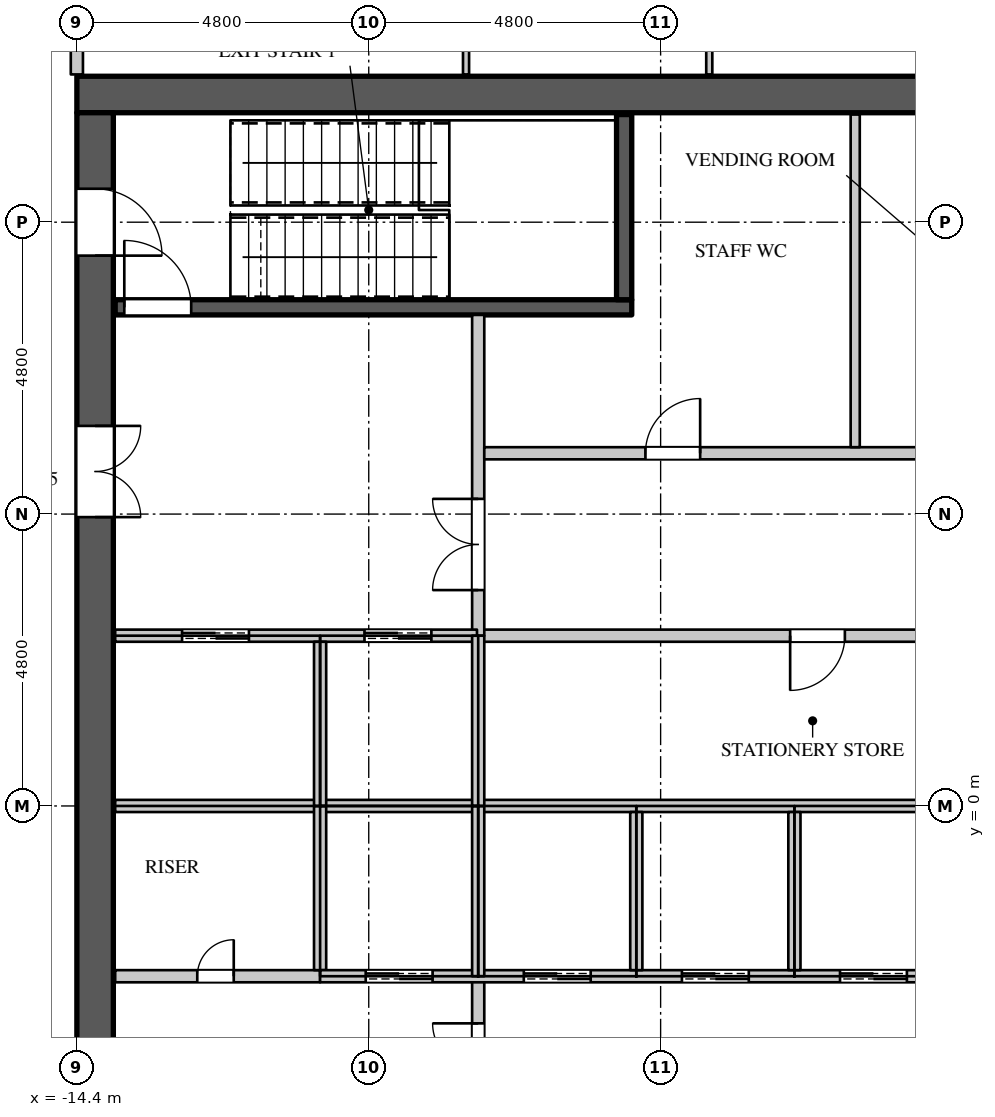
"""IFC4 building model, lengths in metres.
Left out: names, types, materials, properties, quantities, classifications, styles, units other than length and angle.
Written with IfcOpenShell. Run it as: python <this file> out.ifc"""

import sys

from ifc_helpers import new_model, si_unit, direction, frame, frame_2d, origin, place, context, subcontext, project, spatial, rectangle, extrude, element, fill, save


model = new_model("IFC4")
c1 = context("Model", 3, precision=1e-05, world=origin(), true_north=direction((0.0, 1.0)))
c2 = subcontext(c1, "Body", "Model", "MODEL_VIEW")
j1 = project(units=[si_unit("LENGTHUNIT", "METRE"), si_unit("PLANEANGLEUNIT", "RADIAN")], contexts=[c1])
p1 = place(None, origin())
s1 = spatial("IfcSite", under=j1, at=p1, CompositionType="ELEMENT")
p2 = place(p1, origin())
s2 = spatial("IfcBuilding", under=s1, at=p2, CompositionType="ELEMENT")
p3 = place(p2, frame((0.0, 0.0, 239.1)))
s3 = spatial("IfcBuildingStorey", under=s2, at=p3, CompositionType="ELEMENT", Elevation=239.1)
p4 = place(p3, frame((-14.4, 11.7, 0.0), z_axis=(0.0, 0.0, 1.0), x_axis=(1.0, 0.0, 0.0)))
e1 = element("IfcWall", 1, at=p4, inside=s3, PredefinedType="SHEAR", context=c2, shape_type="SweptSolid", body=[
    extrude(rectangle(XDim=28.8, YDim=0.6, at=frame_2d((14.4, 0.0))), origin(), (0.0, 0.0, 1.0), 4.2),
])
p5 = place(p3, frame((-14.1, -11.4, 0.0), z_axis=(0.0, 0.0, 1.0), x_axis=(0.0, 1.0, 0.0)))
e2 = element("IfcWall", 2, at=p5, inside=s3, PredefinedType="SHEAR", context=c2, shape_type="SweptSolid", body=[
    extrude(rectangle(XDim=22.8, YDim=0.6, at=frame_2d((11.4, 0.0))), origin(), (0.0, 0.0, 1.0), 4.2),
])
p6 = place(p5, frame((20.45, 0.0, 0.0)))
e3 = element("IfcOpeningElement", 3, at=p6, cuts=e2, PredefinedType="OPENING", context=c2, shape_type="SweptSolid", body=[
    extrude(rectangle(XDim=1.1, YDim=2.2, at=frame_2d((0.55, 1.1))), frame((0.0, 0.31, 0.0), z_axis=(0.0, -1.0, 0.0), x_axis=(1.0, 0.0, 0.0)), (0.0, 0.0, 1.0), 0.62),
])
p7 = place(p5, frame((1.25, 0.0, 0.0)))
e4 = element("IfcOpeningElement", 4, at=p7, cuts=e2, PredefinedType="OPENING", context=c2, shape_type="SweptSolid", body=[
    extrude(rectangle(XDim=1.1, YDim=2.2, at=frame_2d((0.55, 1.1))), frame((0.0, 0.31, 0.0), z_axis=(0.0, -1.0, 0.0), x_axis=(1.0, 0.0, 0.0)), (0.0, 0.0, 1.0), 0.62),
])
p8 = place(p5, frame((16.15, 0.0, 0.0)))
e5 = element("IfcOpeningElement", 5, at=p8, cuts=e2, PredefinedType="OPENING", context=c2, shape_type="SweptSolid", body=[
    extrude(rectangle(XDim=1.5, YDim=2.4, at=frame_2d((0.75, 1.2))), frame((0.0, 0.31, 0.0), z_axis=(0.0, -1.0, 0.0), x_axis=(1.0, 0.0, 0.0)), (0.0, 0.0, 1.0), 0.62),
])
p9 = place(p5, frame((5.15, 0.0, 0.0)))
e6 = element("IfcOpeningElement", 6, at=p9, cuts=e2, PredefinedType="OPENING", context=c2, shape_type="SweptSolid", body=[
    extrude(rectangle(XDim=1.5, YDim=2.4, at=frame_2d((0.75, 1.2))), frame((0.0, 0.31, 0.0), z_axis=(0.0, -1.0, 0.0), x_axis=(1.0, 0.0, 0.0)), (0.0, 0.0, 1.0), 0.62),
])
p10 = place(p3, frame((-14.4, 12.03, 0.0), z_axis=(0.0, 0.0, 1.0), x_axis=(0.0, 1.0, 0.0)))
e7 = element("IfcWall", 7, at=p10, inside=s3, PredefinedType="PARTITIONING", context=c2, shape_type="SweptSolid", body=[
    extrude(rectangle(XDim=2.27, YDim=0.2, at=frame_2d((1.135, 0.0))), origin(), (0.0, 0.0, 1.0), 3.95),
])
p11 = place(p3, frame((-7.82, 2.8, 0.0), z_axis=(0.0, 0.0, 1.0), x_axis=(1.0, 0.0, 0.0)))
e8 = element("IfcWall", 8, at=p11, inside=s3, PredefinedType="PARTITIONING", context=c2, shape_type="SweptSolid", body=[
    extrude(rectangle(XDim=18.24, YDim=0.2, at=frame_2d((9.12, 0.0))), origin(), (0.0, 0.0, 1.0), 3.95),
])
p12 = place(p11, frame((5.15, 0.0, 0.0)))
e9 = element("IfcOpeningElement", 9, at=p12, cuts=e8, PredefinedType="OPENING", context=c2, shape_type="SweptSolid", body=[
    extrude(rectangle(XDim=0.9, YDim=2.2, at=frame_2d((0.45, 1.1))), frame((0.0, 0.11, 0.0), z_axis=(0.0, -1.0, 0.0), x_axis=(1.0, 0.0, 0.0)), (0.0, 0.0, 1.0), 0.22),
])
p13 = place(p11, frame((14.1, 0.0, 0.0)))
e10 = element("IfcOpeningElement", 10, at=p13, cuts=e8, PredefinedType="OPENING", context=c2, shape_type="SweptSolid", body=[
    extrude(rectangle(XDim=0.9, YDim=2.2, at=frame_2d((0.45, 1.1))), frame((0.0, 0.11, 0.0), z_axis=(0.0, -1.0, 0.0), x_axis=(1.0, 0.0, 0.0)), (0.0, 0.0, 1.0), 0.22),
])
p14 = place(p3, frame((-7.8, -8.075, 0.0), z_axis=(0.0, 0.0, 1.0), x_axis=(0.0, 1.0, 0.0)))
e11 = element("IfcWall", 11, at=p14, inside=s3, PredefinedType="PARTITIONING", context=c2, shape_type="SweptSolid", body=[
    extrude(rectangle(XDim=5.275, YDim=0.2, at=frame_2d((2.637, 0.0))), origin(), (0.0, 0.0, 1.0), 3.95),
])
p15 = place(p14, frame((3.0, 0.0, 0.0)))
e12 = element("IfcOpeningElement", 12, at=p15, cuts=e11, PredefinedType="OPENING", context=c2, shape_type="SweptSolid", body=[
    extrude(rectangle(XDim=1.5, YDim=2.4, at=frame_2d((0.75, 1.2))), frame((0.0, 0.11, 0.0), z_axis=(0.0, -1.0, 0.0), x_axis=(1.0, 0.0, 0.0)), (0.0, 0.0, 1.0), 0.22),
])
p16 = place(p3, frame((-7.8, 2.8, 0.0), z_axis=(0.0, 0.0, 1.0), x_axis=(0.0, 1.0, 0.0)))
e13 = element("IfcWall", 13, at=p16, inside=s3, PredefinedType="PARTITIONING", context=c2, shape_type="SweptSolid", body=[
    extrude(rectangle(XDim=5.275, YDim=0.2, at=frame_2d((2.637, 0.0))), origin(), (0.0, 0.0, 1.0), 3.95),
])
p17 = place(p16, frame((0.75, 0.0, 0.0)))
e14 = element("IfcOpeningElement", 14, at=p17, cuts=e13, PredefinedType="OPENING", context=c2, shape_type="SweptSolid", body=[
    extrude(rectangle(XDim=1.5, YDim=2.4, at=frame_2d((0.75, 1.2))), frame((0.0, 0.11, 0.0), z_axis=(0.0, -1.0, 0.0), x_axis=(1.0, 0.0, 0.0)), (0.0, 0.0, 1.0), 0.22),
])
p18 = place(p3, frame((-7.7, 5.8, 0.0), z_axis=(0.0, 0.0, 1.0), x_axis=(1.0, 0.0, 0.0)))
e15 = element("IfcWall", 15, at=p18, inside=s3, PredefinedType="PARTITIONING", context=c2, shape_type="SweptSolid", body=[
    extrude(rectangle(XDim=9.92, YDim=0.2, at=frame_2d((4.96, 0.0))), origin(), (0.0, 0.0, 1.0), 3.95),
])
p19 = place(p18, frame((2.65, 0.0, 0.0)))
e16 = element("IfcOpeningElement", 16, at=p19, cuts=e15, PredefinedType="OPENING", context=c2, shape_type="SweptSolid", body=[
    extrude(rectangle(XDim=0.9, YDim=2.2, at=frame_2d((0.45, 1.1))), frame((0.0, 0.11, 0.0), z_axis=(0.0, -1.0, 0.0), x_axis=(1.0, 0.0, 0.0)), (0.0, 0.0, 1.0), 0.22),
])
p20 = place(p18, frame((7.5, 0.0, 0.0)))
e17 = element("IfcOpeningElement", 17, at=p20, cuts=e15, PredefinedType="OPENING", context=c2, shape_type="SweptSolid", body=[
    extrude(rectangle(XDim=0.9, YDim=2.2, at=frame_2d((0.45, 1.1))), frame((0.0, 0.11, 0.0), z_axis=(0.0, -1.0, 0.0), x_axis=(1.0, 0.0, 0.0)), (0.0, 0.0, 1.0), 0.22),
])
p21 = place(p3, frame((-1.6, 5.9, 0.0), z_axis=(0.0, 0.0, 1.0), x_axis=(0.0, 1.0, 0.0)))
e18 = element("IfcWall", 18, at=p21, inside=s3, PredefinedType="PARTITIONING", context=c2, shape_type="SweptSolid", body=[
    extrude(rectangle(XDim=5.47, YDim=0.15, at=frame_2d((2.735, 0.0))), origin(), (0.0, 0.0, 1.0), 3.95),
])
p22 = place(p3, frame((-13.77, -2.8, 0.0), z_axis=(0.0, 0.0, 1.0), x_axis=(1.0, 0.0, 0.0)))
e19 = element("IfcWall", 19, at=p22, inside=s3, PredefinedType="PARTITIONING", context=c2, shape_type="SweptSolid", body=[
    extrude(rectangle(XDim=3.37, YDim=0.2, at=frame_2d((1.685, 0.0))), origin(), (0.0, 0.0, 1.0), 3.95),
])
p23 = place(p22, frame((1.35, 0.0, 0.0)))
e20 = element("IfcOpeningElement", 20, at=p23, cuts=e19, PredefinedType="OPENING", context=c2, shape_type="SweptSolid", body=[
    extrude(rectangle(XDim=0.6, YDim=2.0, at=frame_2d((0.3, 1.0))), frame((0.0, 0.11, 0.0), z_axis=(0.0, -1.0, 0.0), x_axis=(1.0, 0.0, 0.0)), (0.0, 0.0, 1.0), 0.22),
])
p24 = place(p3, frame((-13.77, 0.0, 0.0), z_axis=(0.0, 0.0, 1.0), x_axis=(1.0, 0.0, 0.0)))
e21 = element("IfcWall", 21, at=p24, inside=s3, PredefinedType="PARTITIONING", context=c2, shape_type="SweptSolid", body=[
    extrude(rectangle(XDim=21.57, YDim=0.2, at=frame_2d((10.785, 0.0))), origin(), (0.0, 0.0, 1.0), 3.95),
])
p25 = place(p3, frame((-13.77, 2.8, 0.0), z_axis=(0.0, 0.0, 1.0), x_axis=(1.0, 0.0, 0.0)))
e22 = element("IfcWall", 22, at=p25, inside=s3, PredefinedType="PARTITIONING", context=c2, shape_type="SweptSolid", body=[
    extrude(rectangle(XDim=5.95, YDim=0.2, at=frame_2d((2.975, 0.0))), origin(), (0.0, 0.0, 1.0), 3.95),
])
p26 = place(p25, frame((1.1, 0.0, 0.0)))
e23 = element("IfcOpeningElement", 23, at=p26, cuts=e22, PredefinedType="OPENING", context=c2, shape_type="SweptSolid", body=[
    extrude(rectangle(XDim=1.1, YDim=2.2, at=frame_2d((0.55, 1.1))), frame((0.0, 0.11, 0.0), z_axis=(0.0, -1.0, 0.0), x_axis=(1.0, 0.0, 0.0)), (0.0, 0.0, 1.0), 0.22),
])
p27 = place(p25, frame((4.1, 0.0, 0.0)))
e24 = element("IfcOpeningElement", 24, at=p27, cuts=e22, PredefinedType="OPENING", context=c2, shape_type="SweptSolid", body=[
    extrude(rectangle(XDim=1.1, YDim=2.2, at=frame_2d((0.55, 1.1))), frame((0.0, 0.11, 0.0), z_axis=(0.0, -1.0, 0.0), x_axis=(1.0, 0.0, 0.0)), (0.0, 0.0, 1.0), 0.22),
])
p28 = place(p3, frame((-10.4, -2.7, 0.0), z_axis=(0.0, 0.0, 1.0), x_axis=(0.0, 1.0, 0.0)))
e25 = element("IfcWall", 25, at=p28, inside=s3, PredefinedType="PARTITIONING", context=c2, shape_type="SweptSolid", body=[
    extrude(rectangle(XDim=2.7, YDim=0.2, at=frame_2d((1.35, 0.0))), origin(), (0.0, 0.0, 1.0), 3.95),
])
p29 = place(p3, frame((-10.4, -2.8, 0.0), z_axis=(0.0, 0.0, 1.0), x_axis=(1.0, 0.0, 0.0)))
e26 = element("IfcWall", 26, at=p29, inside=s3, PredefinedType="PARTITIONING", context=c2, shape_type="SweptSolid", body=[
    extrude(rectangle(XDim=18.2, YDim=0.2, at=frame_2d((9.1, 0.0))), origin(), (0.0, 0.0, 1.0), 3.95),
])
p30 = place(p29, frame((0.75, 0.0, 0.0)))
e27 = element("IfcOpeningElement", 27, at=p30, cuts=e26, PredefinedType="OPENING", context=c2, shape_type="SweptSolid", body=[
    extrude(rectangle(XDim=1.1, YDim=2.2, at=frame_2d((0.55, 1.1))), frame((0.0, 0.11, 0.0), z_axis=(0.0, -1.0, 0.0), x_axis=(1.0, 0.0, 0.0)), (0.0, 0.0, 1.0), 0.22),
])
p31 = place(p29, frame((3.35, 0.0, 0.0)))
e28 = element("IfcOpeningElement", 28, at=p31, cuts=e26, PredefinedType="OPENING", context=c2, shape_type="SweptSolid", body=[
    extrude(rectangle(XDim=1.1, YDim=2.2, at=frame_2d((0.55, 1.1))), frame((0.0, 0.11, 0.0), z_axis=(0.0, -1.0, 0.0), x_axis=(1.0, 0.0, 0.0)), (0.0, 0.0, 1.0), 0.22),
])
p32 = place(p29, frame((5.95, 0.0, 0.0)))
e29 = element("IfcOpeningElement", 29, at=p32, cuts=e26, PredefinedType="OPENING", context=c2, shape_type="SweptSolid", body=[
    extrude(rectangle(XDim=1.1, YDim=2.2, at=frame_2d((0.55, 1.1))), frame((0.0, 0.11, 0.0), z_axis=(0.0, -1.0, 0.0), x_axis=(1.0, 0.0, 0.0)), (0.0, 0.0, 1.0), 0.22),
])
p33 = place(p29, frame((8.55, 0.0, 0.0)))
e30 = element("IfcOpeningElement", 30, at=p33, cuts=e26, PredefinedType="OPENING", context=c2, shape_type="SweptSolid", body=[
    extrude(rectangle(XDim=1.1, YDim=2.2, at=frame_2d((0.55, 1.1))), frame((0.0, 0.11, 0.0), z_axis=(0.0, -1.0, 0.0), x_axis=(1.0, 0.0, 0.0)), (0.0, 0.0, 1.0), 0.22),
])
p34 = place(p29, frame((11.15, 0.0, 0.0)))
e31 = element("IfcOpeningElement", 31, at=p34, cuts=e26, PredefinedType="OPENING", context=c2, shape_type="SweptSolid", body=[
    extrude(rectangle(XDim=1.1, YDim=2.2, at=frame_2d((0.55, 1.1))), frame((0.0, 0.11, 0.0), z_axis=(0.0, -1.0, 0.0), x_axis=(1.0, 0.0, 0.0)), (0.0, 0.0, 1.0), 0.22),
])
p35 = place(p29, frame((13.75, 0.0, 0.0)))
e32 = element("IfcOpeningElement", 32, at=p35, cuts=e26, PredefinedType="OPENING", context=c2, shape_type="SweptSolid", body=[
    extrude(rectangle(XDim=1.1, YDim=2.2, at=frame_2d((0.55, 1.1))), frame((0.0, 0.11, 0.0), z_axis=(0.0, -1.0, 0.0), x_axis=(1.0, 0.0, 0.0)), (0.0, 0.0, 1.0), 0.22),
])
p36 = place(p29, frame((16.35, 0.0, 0.0)))
e33 = element("IfcOpeningElement", 33, at=p36, cuts=e26, PredefinedType="OPENING", context=c2, shape_type="SweptSolid", body=[
    extrude(rectangle(XDim=1.1, YDim=2.2, at=frame_2d((0.55, 1.1))), frame((0.0, 0.11, 0.0), z_axis=(0.0, -1.0, 0.0), x_axis=(1.0, 0.0, 0.0)), (0.0, 0.0, 1.0), 0.22),
])
p37 = place(p3, frame((-10.4, 0.0, 0.0), z_axis=(0.0, 0.0, 1.0), x_axis=(0.0, 1.0, 0.0)))
e34 = element("IfcWall", 34, at=p37, inside=s3, PredefinedType="PARTITIONING", context=c2, shape_type="SweptSolid", body=[
    extrude(rectangle(XDim=2.7, YDim=0.2, at=frame_2d((1.35, 0.0))), origin(), (0.0, 0.0, 1.0), 3.95),
])
for number, where, z_axis, x_axis in (
    (35, (-7.8, -2.8, 0.0), (0.0, 0.0, 1.0), (0.0, 1.0, 0.0)),
    (36, (-7.8, 0.0, 0.0), (0.0, 0.0, 1.0), (0.0, 1.0, 0.0)),
):
    element("IfcWall", number, at=place(p3, frame(where, z_axis=z_axis, x_axis=x_axis)), inside=s3, PredefinedType="PARTITIONING", context=c2, shape_type="SweptSolid", body=[
        extrude(rectangle(XDim=2.8, YDim=0.2, at=frame_2d((1.4, 0.0))), origin(), (0.0, 0.0, 1.0), 3.95),
    ])
for number, where, z_axis, x_axis in (
    (37, (-5.2, -2.7, 0.0), (0.0, 0.0, 1.0), (0.0, 1.0, 0.0)),
    (38, (-2.6, -2.7, 0.0), (0.0, 0.0, 1.0), (0.0, 1.0, 0.0)),
):
    element("IfcWall", number, at=place(p3, frame(where, z_axis=z_axis, x_axis=x_axis)), inside=s3, PredefinedType="PARTITIONING", context=c2, shape_type="SweptSolid", body=[
        extrude(rectangle(XDim=2.6, YDim=0.2, at=frame_2d((1.3, 0.0))), origin(), (0.0, 0.0, 1.0), 3.95),
    ])
p38 = place(p3, frame((-13.77, 8.2, 0.0), z_axis=(0.0, 0.0, 1.0), x_axis=(1.0, 0.0, 0.0)))
e39 = element("IfcWall", 39, at=p38, inside=s3, PredefinedType="SHEAR", context=c2, shape_type="SweptSolid", body=[
    extrude(rectangle(XDim=8.495, YDim=0.25, at=frame_2d((4.248, 0.0))), origin(), (0.0, 0.0, 1.0), 3.95),
])
p39 = place(p38, frame((0.15, 0.0, 0.0)))
e40 = element("IfcOpeningElement", 40, at=p39, cuts=e39, PredefinedType="OPENING", context=c2, shape_type="SweptSolid", body=[
    extrude(rectangle(XDim=1.1, YDim=2.2, at=frame_2d((0.55, 1.1))), frame((0.0, 0.135, 0.0), z_axis=(0.0, -1.0, 0.0), x_axis=(1.0, 0.0, 0.0)), (0.0, 0.0, 1.0), 0.27),
])
p40 = place(p3, frame((-5.4, 8.325, 0.0), z_axis=(0.0, 0.0, 1.0), x_axis=(0.0, 1.0, 0.0)))
e41 = element("IfcWall", 41, at=p40, inside=s3, PredefinedType="SHEAR", context=c2, shape_type="SweptSolid", body=[
    extrude(rectangle(XDim=3.045, YDim=0.25, at=frame_2d((1.522, 0.0))), origin(), (0.0, 0.0, 1.0), 3.95),
])
p41 = place(p3, frame((-8.0, 12.03, 0.0), z_axis=(0.0, 0.0, 1.0), x_axis=(0.0, 1.0, 0.0)))
e42 = element("IfcWall", 42, at=p41, inside=s3, PredefinedType="PARTITIONING", context=c2, shape_type="SweptSolid", body=[
    extrude(rectangle(XDim=6.395, YDim=0.1, at=frame_2d((3.198, 0.0))), origin(), (0.0, 0.0, 1.0), 3.95),
])
p42 = place(p41, frame((2.75, 0.0, 0.0)))
e43 = element("IfcOpeningElement", 43, at=p42, cuts=e42, PredefinedType="OPENING", context=c2, shape_type="SweptSolid", body=[
    extrude(rectangle(XDim=0.9, YDim=2.2, at=frame_2d((0.45, 1.1))), frame((0.0, 0.06, 0.0), z_axis=(0.0, -1.0, 0.0), x_axis=(1.0, 0.0, 0.0)), (0.0, 0.0, 1.0), 0.12),
])
p43 = place(p3, frame((-4.0, 12.03, 0.0), z_axis=(0.0, 0.0, 1.0), x_axis=(0.0, 1.0, 0.0)))
e44 = element("IfcWall", 44, at=p43, inside=s3, PredefinedType="PARTITIONING", context=c2, shape_type="SweptSolid", body=[
    extrude(rectangle(XDim=5.92, YDim=0.1, at=frame_2d((2.96, 0.0))), origin(), (0.0, 0.0, 1.0), 3.95),
])
p44 = place(p23, origin())
e45 = element("IfcDoor", 45, at=p44, inside=s3, OperationType="SINGLE_SWING_RIGHT", PredefinedType="DOOR", context=c2, shape_type="SweptSolid", body=[
    extrude(rectangle(XDim=0.6, YDim=2.0, at=frame_2d((0.3, 1.0))), frame((0.0, 0.025, 0.0), z_axis=(0.0, -1.0, 0.0), x_axis=(1.0, 0.0, 0.0)), (0.0, 0.0, 1.0), 0.05),
])
fill(e20, e45)
p45 = place(p19, origin())
e46 = element("IfcDoor", 46, at=p45, inside=s3, OperationType="SINGLE_SWING_RIGHT", PredefinedType="DOOR", context=c2, shape_type="SweptSolid", body=[
    extrude(rectangle(XDim=0.9, YDim=2.2, at=frame_2d((0.45, 1.1))), frame((0.0, 0.025, 0.0), z_axis=(0.0, -1.0, 0.0), x_axis=(1.0, 0.0, 0.0)), (0.0, 0.0, 1.0), 0.05),
])
fill(e16, e46)
p46 = place(p12, origin())
e47 = element("IfcDoor", 47, at=p46, inside=s3, OperationType="SINGLE_SWING_RIGHT", PredefinedType="DOOR", context=c2, shape_type="SweptSolid", body=[
    extrude(rectangle(XDim=0.9, YDim=2.2, at=frame_2d((0.45, 1.1))), frame((0.0, 0.025, 0.0), z_axis=(0.0, -1.0, 0.0), x_axis=(1.0, 0.0, 0.0)), (0.0, 0.0, 1.0), 0.05),
])
fill(e9, e47)
p47 = place(p26, origin())
e48 = element("IfcDoor", 48, at=p47, inside=s3, OperationType="DOUBLE_DOOR_SLIDING", PredefinedType="DOOR", context=c2, shape_type="SweptSolid", body=[
    extrude(rectangle(XDim=1.1, YDim=2.2, at=frame_2d((0.55, 1.1))), frame((0.0, 0.025, 0.0), z_axis=(0.0, -1.0, 0.0), x_axis=(1.0, 0.0, 0.0)), (0.0, 0.0, 1.0), 0.05),
])
fill(e23, e48)
p48 = place(p27, origin())
e49 = element("IfcDoor", 49, at=p48, inside=s3, OperationType="DOUBLE_DOOR_SLIDING", PredefinedType="DOOR", context=c2, shape_type="SweptSolid", body=[
    extrude(rectangle(XDim=1.1, YDim=2.2, at=frame_2d((0.55, 1.1))), frame((0.0, 0.025, 0.0), z_axis=(0.0, -1.0, 0.0), x_axis=(1.0, 0.0, 0.0)), (0.0, 0.0, 1.0), 0.05),
])
fill(e24, e49)
p49 = place(p30, origin())
e50 = element("IfcDoor", 50, at=p49, inside=s3, OperationType="DOUBLE_DOOR_SLIDING", PredefinedType="DOOR", context=c2, shape_type="SweptSolid", body=[
    extrude(rectangle(XDim=1.1, YDim=2.2, at=frame_2d((0.55, 1.1))), frame((0.0, 0.025, 0.0), z_axis=(0.0, -1.0, 0.0), x_axis=(1.0, 0.0, 0.0)), (0.0, 0.0, 1.0), 0.05),
])
fill(e27, e50)
p50 = place(p31, origin())
e51 = element("IfcDoor", 51, at=p50, inside=s3, OperationType="DOUBLE_DOOR_SLIDING", PredefinedType="DOOR", context=c2, shape_type="SweptSolid", body=[
    extrude(rectangle(XDim=1.1, YDim=2.2, at=frame_2d((0.55, 1.1))), frame((0.0, 0.025, 0.0), z_axis=(0.0, -1.0, 0.0), x_axis=(1.0, 0.0, 0.0)), (0.0, 0.0, 1.0), 0.05),
])
fill(e28, e51)
p51 = place(p32, origin())
e52 = element("IfcDoor", 52, at=p51, inside=s3, OperationType="DOUBLE_DOOR_SLIDING", PredefinedType="DOOR", context=c2, shape_type="SweptSolid", body=[
    extrude(rectangle(XDim=1.1, YDim=2.2, at=frame_2d((0.55, 1.1))), frame((0.0, 0.025, 0.0), z_axis=(0.0, -1.0, 0.0), x_axis=(1.0, 0.0, 0.0)), (0.0, 0.0, 1.0), 0.05),
])
fill(e29, e52)
p52 = place(p33, origin())
e53 = element("IfcDoor", 53, at=p52, inside=s3, OperationType="DOUBLE_DOOR_SLIDING", PredefinedType="DOOR", context=c2, shape_type="SweptSolid", body=[
    extrude(rectangle(XDim=1.1, YDim=2.2, at=frame_2d((0.55, 1.1))), frame((0.0, 0.025, 0.0), z_axis=(0.0, -1.0, 0.0), x_axis=(1.0, 0.0, 0.0)), (0.0, 0.0, 1.0), 0.05),
])
fill(e30, e53)
p53 = place(p39, origin())
e54 = element("IfcDoor", 54, at=p53, inside=s3, OperationType="SINGLE_SWING_LEFT", PredefinedType="DOOR", context=c2, shape_type="SweptSolid", body=[
    extrude(rectangle(XDim=1.1, YDim=2.2, at=frame_2d((0.55, 1.1))), frame((0.0, 0.025, 0.0), z_axis=(0.0, -1.0, 0.0), x_axis=(1.0, 0.0, 0.0)), (0.0, 0.0, 1.0), 0.05),
])
fill(e40, e54)
p54 = place(p17, origin())
e55 = element("IfcDoor", 55, at=p54, inside=s3, OperationType="DOUBLE_DOOR_SINGLE_SWING", PredefinedType="DOOR", context=c2, shape_type="SweptSolid", body=[
    extrude(rectangle(XDim=1.5, YDim=2.4, at=frame_2d((0.75, 1.2))), frame((0.0, 0.025, 0.0), z_axis=(0.0, -1.0, 0.0), x_axis=(1.0, 0.0, 0.0)), (0.0, 0.0, 1.0), 0.05),
])
fill(e14, e55)
p55 = place(p15, origin())
e56 = element("IfcDoor", 56, at=p55, inside=s3, OperationType="DOUBLE_DOOR_SINGLE_SWING", PredefinedType="DOOR", context=c2, shape_type="SweptSolid", body=[
    extrude(rectangle(XDim=1.5, YDim=2.4, at=frame_2d((0.75, 1.2))), frame((0.0, 0.025, 0.0), z_axis=(0.0, -1.0, 0.0), x_axis=(1.0, 0.0, 0.0)), (0.0, 0.0, 1.0), 0.05),
])
fill(e12, e56)
p56 = place(p6, origin())
e57 = element("IfcDoor", 57, at=p56, inside=s3, OperationType="SINGLE_SWING_RIGHT", PredefinedType="DOOR", context=c2, shape_type="SweptSolid", body=[
    extrude(rectangle(XDim=1.1, YDim=2.2, at=frame_2d((0.55, 1.1))), frame((0.0, -0.245, 0.0), z_axis=(0.0, -1.0, 0.0), x_axis=(1.0, 0.0, 0.0)), (0.0, 0.0, 1.0), 0.05),
])
fill(e3, e57)
p57 = place(p8, origin())
e58 = element("IfcDoor", 58, at=p57, inside=s3, OperationType="DOUBLE_DOOR_SINGLE_SWING", PredefinedType="DOOR", context=c2, shape_type="SweptSolid", body=[
    extrude(rectangle(XDim=1.5, YDim=2.4, at=frame_2d((0.75, 1.2))), frame((0.0, -0.245, 0.0), z_axis=(0.0, -1.0, 0.0), x_axis=(1.0, 0.0, 0.0)), (0.0, 0.0, 1.0), 0.05),
])
fill(e5, e58)
save(model, sys.argv[1])
